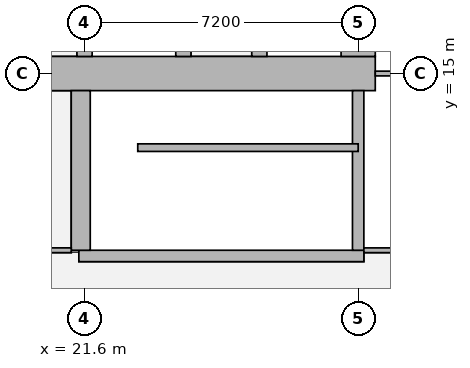
"""IFC4 building model, lengths in metres.
Left out: names, types, materials, properties, quantities, classifications, styles, units other than length and angle.
Written with IfcOpenShell. Run it as: python <this file> out.ifc"""

import sys

from ifc_helpers import new_model, si_unit, direction, frame, frame_2d, origin, place, context, subcontext, project, spatial, rectangle, extrude, element, fill, save


model = new_model("IFC4")
c1 = context("Model", 3, precision=1e-05, world=origin(), true_north=direction((0.0, 1.0)))
c2 = subcontext(c1, "Body", "Model", "MODEL_VIEW")
j1 = project(units=[si_unit("LENGTHUNIT", "METRE"), si_unit("PLANEANGLEUNIT", "RADIAN")], contexts=[c1])
p1 = place(None, origin())
s1 = spatial("IfcSite", under=j1, at=p1, CompositionType="ELEMENT")
p2 = place(p1, origin())
s2 = spatial("IfcBuilding", under=s1, at=p2, CompositionType="ELEMENT")
p3 = place(p2, frame((0.0, 0.0, 139.55)))
s3 = spatial("IfcBuildingStorey", under=s2, at=p3, CompositionType="ELEMENT", Elevation=139.55)
p4 = place(p3, frame((13.95, 15.0, 0.0), z_axis=(0.0, 0.0, 1.0), x_axis=(1.0, 0.0, 0.0)))
e1 = element("IfcWall", 1, at=p4, inside=s3, PredefinedType="SHEAR", context=c2, shape_type="SweptSolid", body=[
    extrude(rectangle(XDim=15.3, YDim=0.9, at=frame_2d((7.65, 0.0))), origin(), (0.0, 0.0, 1.0), 3.75),
])
p5 = place(p4, frame((4.45, 0.0, 0.0)))
e2 = element("IfcOpeningElement", 2, at=p5, cuts=e1, PredefinedType="OPENING", context=c2, shape_type="SweptSolid", body=[
    extrude(rectangle(XDim=1.8, YDim=2.1, at=frame_2d((0.9, 1.05))), frame((0.0, 0.46, 0.0), z_axis=(0.0, -1.0, 0.0), x_axis=(1.0, 0.0, 0.0)), (0.0, 0.0, 1.0), 0.92),
])
p6 = place(p4, frame((10.7, 0.0, 0.0)))
e3 = element("IfcOpeningElement", 3, at=p6, cuts=e1, PredefinedType="OPENING", context=c2, shape_type="SweptSolid", body=[
    extrude(rectangle(XDim=1.1, YDim=2.1, at=frame_2d((0.55, 1.05))), frame((0.0, 0.46, 0.0), z_axis=(0.0, -1.0, 0.0), x_axis=(1.0, 0.0, 0.0)), (0.0, 0.0, 1.0), 0.92),
])
p7 = place(p3, frame((28.8, 15.45, 0.0), z_axis=(0.0, 0.0, 1.0), x_axis=(0.0, 1.0, 0.0)))
e4 = element("IfcWall", 4, at=p7, inside=s3, PredefinedType="SHEAR", context=c2, shape_type="SweptSolid", body=[
    extrude(rectangle(XDim=14.1, YDim=0.9, at=frame_2d((7.05, 0.0))), origin(), (0.0, 0.0, 1.0), 3.75),
])
p8 = place(p3, frame((21.6, 15.45, 0.0), z_axis=(0.0, 0.0, 1.0), x_axis=(0.0, 1.0, 0.0)))
e5 = element("IfcWall", 5, at=p8, inside=s3, PredefinedType="SHEAR", context=c2, shape_type="SweptSolid", body=[
    extrude(rectangle(XDim=14.1, YDim=0.4, at=frame_2d((7.05, 0.0))), origin(), (0.0, 0.0, 1.0), 3.75),
])
p9 = place(p8, frame((0.875, 0.0, 0.0)))
e6 = element("IfcOpeningElement", 6, at=p9, cuts=e5, PredefinedType="OPENING", context=c2, shape_type="SweptSolid", body=[
    extrude(rectangle(XDim=1.1, YDim=2.1, at=frame_2d((0.55, 1.05))), frame((0.0, 0.21, 0.0), z_axis=(0.0, -1.0, 0.0), x_axis=(1.0, 0.0, 0.0)), (0.0, 0.0, 1.0), 0.42),
])
p10 = place(p8, frame((4.625, 0.0, 0.0)))
e7 = element("IfcOpeningElement", 7, at=p10, cuts=e5, PredefinedType="OPENING", context=c2, shape_type="SweptSolid", body=[
    extrude(rectangle(XDim=1.1, YDim=2.1, at=frame_2d((0.55, 1.05))), frame((0.0, 0.21, 0.0), z_axis=(0.0, -1.0, 0.0), x_axis=(1.0, 0.0, 0.0)), (0.0, 0.0, 1.0), 0.42),
])
p11 = place(p8, frame((8.375, 0.0, 0.0)))
e8 = element("IfcOpeningElement", 8, at=p11, cuts=e5, PredefinedType="OPENING", context=c2, shape_type="SweptSolid", body=[
    extrude(rectangle(XDim=1.1, YDim=2.1, at=frame_2d((0.55, 1.05))), frame((0.0, 0.21, 0.0), z_axis=(0.0, -1.0, 0.0), x_axis=(1.0, 0.0, 0.0)), (0.0, 0.0, 1.0), 0.42),
])
p12 = place(p8, frame((12.125, 0.0, 0.0)))
e9 = element("IfcOpeningElement", 9, at=p12, cuts=e5, PredefinedType="OPENING", context=c2, shape_type="SweptSolid", body=[
    extrude(rectangle(XDim=1.1, YDim=2.1, at=frame_2d((0.55, 1.05))), frame((0.0, 0.21, 0.0), z_axis=(0.0, -1.0, 0.0), x_axis=(1.0, 0.0, 0.0)), (0.0, 0.0, 1.0), 0.42),
])
p13 = place(p3, frame((24.2, 15.45, 0.0), z_axis=(0.0, 0.0, 1.0), x_axis=(0.0, 1.0, 0.0)))
e10 = element("IfcWall", 10, at=p13, inside=s3, PredefinedType="SHEAR", context=c2, shape_type="SweptSolid", body=[
    extrude(rectangle(XDim=14.1, YDim=0.4, at=frame_2d((7.05, 0.0))), origin(), (0.0, 0.0, 1.0), 3.75),
])
p14 = place(p3, frame((26.2, 15.45, 0.0), z_axis=(0.0, 0.0, 1.0), x_axis=(0.0, 1.0, 0.0)))
e11 = element("IfcWall", 11, at=p14, inside=s3, PredefinedType="SHEAR", context=c2, shape_type="SweptSolid", body=[
    extrude(rectangle(XDim=3.1, YDim=0.4, at=frame_2d((1.55, 0.0))), origin(), (0.0, 0.0, 1.0), 3.75),
])
p15 = place(p14, frame((0.825, 0.0, 0.0)))
e12 = element("IfcOpeningElement", 12, at=p15, cuts=e11, PredefinedType="OPENING", context=c2, shape_type="SweptSolid", body=[
    extrude(rectangle(XDim=1.2, YDim=2.1, at=frame_2d((0.6, 1.05))), frame((0.0, 0.21, 0.0), z_axis=(0.0, -1.0, 0.0), x_axis=(1.0, 0.0, 0.0)), (0.0, 0.0, 1.0), 0.42),
])
p16 = place(p3, frame((21.45, 10.2, 0.0), z_axis=(0.0, 0.0, 1.0), x_axis=(1.0, 0.0, 0.0)))
e13 = element("IfcWall", 13, at=p16, inside=s3, PredefinedType="SHEAR", context=c2, shape_type="SweptSolid", body=[
    extrude(rectangle(XDim=7.5, YDim=0.3, at=frame_2d((3.75, 0.0))), origin(), (0.0, 0.0, 1.0), 3.75),
])
p17 = place(p16, frame((0.5, 0.0, 0.0)))
e14 = element("IfcOpeningElement", 14, at=p17, cuts=e13, PredefinedType="OPENING", context=c2, shape_type="SweptSolid", body=[
    extrude(rectangle(XDim=1.1, YDim=2.1, at=frame_2d((0.55, 1.05))), frame((0.0, 0.16, 0.0), z_axis=(0.0, -1.0, 0.0), x_axis=(1.0, 0.0, 0.0)), (0.0, 0.0, 1.0), 0.32),
])
p18 = place(p3, frame((21.5, 10.35, 0.0), z_axis=(0.0, 0.0, 1.0), x_axis=(0.0, 1.0, 0.0)))
e15 = element("IfcWall", 15, at=p18, inside=s3, PredefinedType="SHEAR", context=c2, shape_type="SweptSolid", body=[
    extrude(rectangle(XDim=4.2, YDim=0.5, at=frame_2d((2.1, 0.0))), origin(), (0.0, 0.0, 1.0), 3.75),
])
p19 = place(p3, frame((28.8, 10.35, 0.0), z_axis=(0.0, 0.0, 1.0), x_axis=(0.0, 1.0, 0.0)))
e16 = element("IfcWall", 16, at=p19, inside=s3, PredefinedType="SHEAR", context=c2, shape_type="SweptSolid", body=[
    extrude(rectangle(XDim=4.2, YDim=0.3, at=frame_2d((2.1, 0.0))), origin(), (0.0, 0.0, 1.0), 3.75),
])
p20 = place(p3, frame((10.413, 10.35, 0.0), z_axis=(0.0, 0.0, 1.0), x_axis=(1.0, 0.0, 0.0)))
e17 = element("IfcWall", 17, at=p20, inside=s3, PredefinedType="PARTITIONING", context=c2, shape_type="SweptSolid", body=[
    extrude(rectangle(XDim=10.837, YDim=0.125, at=frame_2d((5.418, 0.0))), origin(), (0.0, 0.0, 1.0), 3.5),
])
p21 = place(p20, frame((7.582, 0.0, 0.0)))
e18 = element("IfcOpeningElement", 18, at=p21, cuts=e17, PredefinedType="OPENING", context=c2, shape_type="SweptSolid", body=[
    extrude(rectangle(XDim=1.8, YDim=2.1, at=frame_2d((0.9, 1.05))), frame((0.0, 0.073, 0.0), z_axis=(0.0, -1.0, 0.0), x_axis=(1.0, 0.0, 0.0)), (0.0, 0.0, 1.0), 0.145),
])
p22 = place(p3, frame((28.95, 10.35, 0.0), z_axis=(0.0, 0.0, 1.0), x_axis=(1.0, 0.0, 0.0)))
e19 = element("IfcWall", 19, at=p22, inside=s3, PredefinedType="PARTITIONING", context=c2, shape_type="SweptSolid", body=[
    extrude(rectangle(XDim=9.013, YDim=0.125, at=frame_2d((4.506, 0.0))), origin(), (0.0, 0.0, 1.0), 3.5),
])
p23 = place(p3, frame((29.25, 15.0, 0.0), z_axis=(0.0, 0.0, 1.0), x_axis=(1.0, 0.0, 0.0)))
e20 = element("IfcWall", 20, at=p23, inside=s3, PredefinedType="PARTITIONING", context=c2, shape_type="SweptSolid", body=[
    extrude(rectangle(XDim=5.176, YDim=0.125, at=frame_2d((2.588, 0.0))), origin(), (0.0, 0.0, 1.0), 3.5),
])
p24 = place(p3, frame((23.0, 13.05, 0.0), z_axis=(0.0, 0.0, 1.0), x_axis=(1.0, 0.0, 0.0)))
e21 = element("IfcWall", 21, at=p24, inside=s3, PredefinedType="SHEAR", context=c2, shape_type="SweptSolid", body=[
    extrude(rectangle(XDim=5.8, YDim=0.2, at=frame_2d((2.9, 0.0))), origin(), (0.0, 0.0, 1.0), 3.75),
])
p25 = place(p6, origin())
e22 = element("IfcDoor", 22, at=p25, inside=s3, OperationType="SINGLE_SWING_RIGHT", PredefinedType="DOOR", context=c2, shape_type="SweptSolid", body=[
    extrude(rectangle(XDim=1.1, YDim=2.1, at=frame_2d((0.55, 1.05))), frame((0.0, 0.025, 0.0), z_axis=(0.0, -1.0, 0.0), x_axis=(1.0, 0.0, 0.0)), (0.0, 0.0, 1.0), 0.05),
])
fill(e3, e22)
p26 = place(p17, origin())
e23 = element("IfcDoor", 23, at=p26, inside=s3, OperationType="SINGLE_SWING_LEFT", PredefinedType="DOOR", context=c2, shape_type="SweptSolid", body=[
    extrude(rectangle(XDim=1.1, YDim=2.1, at=frame_2d((0.55, 1.05))), frame((0.0, 0.025, 0.0), z_axis=(0.0, -1.0, 0.0), x_axis=(1.0, 0.0, 0.0)), (0.0, 0.0, 1.0), 0.05),
])
fill(e14, e23)
save(model, sys.argv[1])
